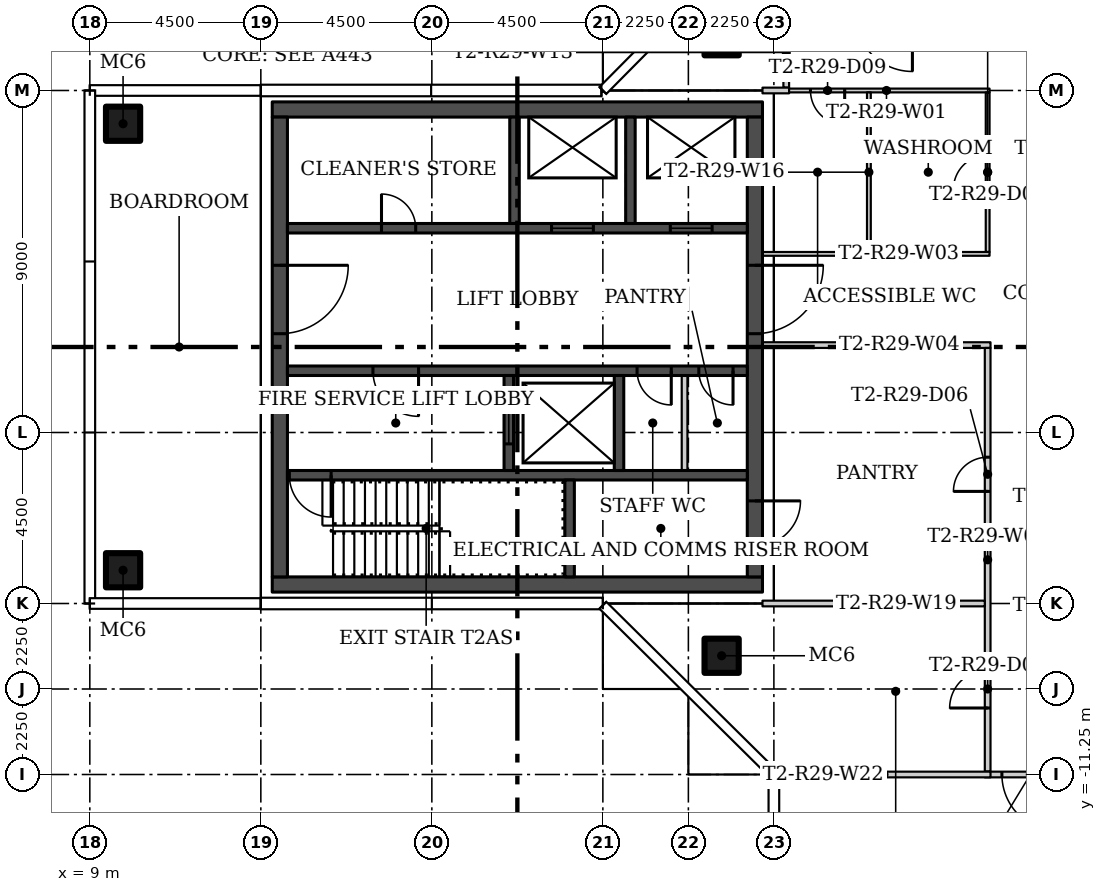
"""IFC4 building model, lengths in metres.
Left out: names, types, materials, properties, quantities, classifications, styles, units other than length and angle.
Written with IfcOpenShell. Run it as: python <this file> out.ifc"""

import sys

from ifc_helpers import new_model, si_unit, direction, frame, frame_2d, origin, origin_2d, place, context, subcontext, project, spatial, rectangle, hollow_rectangle, extrude, element, fill, save


model = new_model("IFC4")
c1 = context("Model", 3, precision=1e-05, world=origin(), true_north=direction((0.0, 1.0)))
c2 = subcontext(c1, "Body", "Model", "MODEL_VIEW")
j1 = project(units=[si_unit("LENGTHUNIT", "METRE"), si_unit("PLANEANGLEUNIT", "RADIAN")], contexts=[c1])
p1 = place(None, origin())
s1 = spatial("IfcSite", under=j1, at=p1, CompositionType="ELEMENT")
p2 = place(p1, origin())
s2 = spatial("IfcBuilding", under=s1, at=p2, CompositionType="ELEMENT")
p3 = place(p2, frame((0.0, 0.0, 261.6)))
s3 = spatial("IfcBuildingStorey", under=s2, at=p3, CompositionType="ELEMENT", Elevation=261.6)
for number, where in (
    (1, (25.625, 8.125, 0.0)),
    (2, (25.625, -8.125, 0.0)),
    (3, (9.875, -5.875, 0.0)),
    (4, (9.875, 5.875, 0.0)),
):
    element("IfcColumn", number, at=place(p3, frame(where)), inside=s3, PredefinedType="COLUMN", context=c2, shape_type="SweptSolid", body=[
        extrude(hollow_rectangle(XDim=0.9, YDim=0.9, WallThickness=0.036, at=origin_2d()), origin(), (0.0, 0.0, 1.0), 3.55),
    ])
p4 = place(p3, frame((32.675, 6.75, 0.0), z_axis=(0.0, 0.0, 1.0), x_axis=(-1.0, 0.0, 0.0)))
e5 = element("IfcWall", 5, at=p4, inside=s3, PredefinedType="PARTITIONING", context=c2, shape_type="SweptSolid", body=[
    extrude(rectangle(XDim=5.425, YDim=0.1, at=frame_2d((2.712, 0.0))), origin(), (0.0, 0.0, 1.0), 3.55),
])
p5 = place(p4, frame((3.812, 0.0, 0.0)))
e6 = element("IfcOpeningElement", 6, at=p5, cuts=e5, PredefinedType="OPENING", context=c2, shape_type="SweptSolid", body=[
    extrude(rectangle(XDim=0.9, YDim=2.1, at=frame_2d((0.45, 1.05))), frame((0.0, 0.06, 0.0), z_axis=(0.0, -1.0, 0.0), x_axis=(1.0, 0.0, 0.0)), (0.0, 0.0, 1.0), 0.12),
])
p6 = place(p3, frame((32.625, 2.5, 0.0), z_axis=(0.0, 0.0, 1.0), x_axis=(0.0, 1.0, 0.0)))
e7 = element("IfcWall", 7, at=p6, inside=s3, PredefinedType="PARTITIONING", context=c2, shape_type="SweptSolid", body=[
    extrude(rectangle(XDim=4.2, YDim=0.1, at=frame_2d((2.1, 0.0))), origin(), (0.0, 0.0, 1.0), 3.55),
])
p7 = place(p6, frame((1.65, 0.0, 0.0)))
e8 = element("IfcOpeningElement", 8, at=p7, cuts=e7, PredefinedType="OPENING", context=c2, shape_type="SweptSolid", body=[
    extrude(rectangle(XDim=0.9, YDim=2.1, at=frame_2d((0.45, 1.05))), frame((0.0, 0.06, 0.0), z_axis=(0.0, -1.0, 0.0), x_axis=(1.0, 0.0, 0.0)), (0.0, 0.0, 1.0), 0.12),
])
p8 = place(p3, frame((26.7, 2.45, 0.0)))
e9 = element("IfcWall", 9, at=p8, inside=s3, PredefinedType="PARTITIONING", context=c2, shape_type="SweptSolid", body=[
    extrude(rectangle(XDim=5.975, YDim=0.1, at=frame_2d((2.988, 0.0))), origin(), (0.0, 0.0, 1.0), 3.55),
])
p9 = place(p3, frame((32.7, 0.05, 0.0), z_axis=(0.0, 0.0, 1.0), x_axis=(-1.0, 0.0, 0.0)))
e10 = element("IfcWall", 10, at=p9, inside=s3, PredefinedType="PARTITIONING", context=c2, shape_type="SweptSolid", body=[
    extrude(rectangle(XDim=6.0, YDim=0.15, at=frame_2d((3.0, 0.0))), origin(), (0.0, 0.0, 1.0), 3.55),
])
p10 = place(p3, frame((32.625, -11.175, 0.0), z_axis=(0.0, 0.0, 1.0), x_axis=(0.0, 1.0, 0.0)))
e11 = element("IfcWall", 11, at=p10, inside=s3, PredefinedType="PARTITIONING", context=c2, shape_type="SweptSolid", body=[
    extrude(rectangle(XDim=11.15, YDim=0.15, at=frame_2d((5.575, 0.0))), origin(), (0.0, 0.0, 1.0), 3.55),
])
p11 = place(p10, frame((7.375, 0.0, 0.0)))
e12 = element("IfcOpeningElement", 12, at=p11, cuts=e11, PredefinedType="OPENING", context=c2, shape_type="SweptSolid", body=[
    extrude(rectangle(XDim=0.9, YDim=2.1, at=frame_2d((0.45, 1.05))), frame((0.0, 0.085, 0.0), z_axis=(0.0, -1.0, 0.0), x_axis=(1.0, 0.0, 0.0)), (0.0, 0.0, 1.0), 0.17),
])
p12 = place(p10, frame((1.675, 0.0, 0.0)))
e13 = element("IfcOpeningElement", 13, at=p12, cuts=e11, PredefinedType="OPENING", context=c2, shape_type="SweptSolid", body=[
    extrude(rectangle(XDim=1.0, YDim=2.4, at=frame_2d((0.5, 1.2))), frame((0.0, 0.085, 0.0), z_axis=(0.0, -1.0, 0.0), x_axis=(1.0, 0.0, 0.0)), (0.0, 0.0, 1.0), 0.17),
])
p13 = place(p3, frame((27.325, 8.675, 0.0), z_axis=(0.0, 0.0, 1.0), x_axis=(0.0, -1.0, 0.0)))
e14 = element("IfcWall", 14, at=p13, inside=s3, PredefinedType="PARTITIONING", context=c2, shape_type="SweptSolid", body=[
    extrude(rectangle(XDim=1.85, YDim=0.15, at=frame_2d((0.925, 0.0))), origin(), (0.0, 0.0, 1.0), 3.55),
])
p14 = place(p3, frame((34.95, -11.25, 0.0), z_axis=(0.0, 0.0, 1.0), x_axis=(-1.0, 0.0, 0.0)))
e15 = element("IfcWall", 15, at=p14, inside=s3, PredefinedType="PARTITIONING", context=c2, shape_type="SweptSolid", body=[
    extrude(rectangle(XDim=2.4, YDim=0.15, at=frame_2d((1.2, 0.0))), origin(), (0.0, 0.0, 1.0), 3.55),
])
p15 = place(p14, frame((0.45, 0.0, 0.0)))
e16 = element("IfcOpeningElement", 16, at=p15, cuts=e15, PredefinedType="OPENING", context=c2, shape_type="SweptSolid", body=[
    extrude(rectangle(XDim=1.5, YDim=2.1, at=frame_2d((0.75, 1.05))), frame((0.0, 0.085, 0.0), z_axis=(0.0, -1.0, 0.0), x_axis=(1.0, 0.0, 0.0)), (0.0, 0.0, 1.0), 0.17),
])
p16 = place(p3, frame((29.5, 6.7, 0.0), z_axis=(0.0, 0.0, 1.0), x_axis=(0.0, -1.0, 0.0)))
e17 = element("IfcWall", 17, at=p16, inside=s3, PredefinedType="PARTITIONING", context=c2, shape_type="SweptSolid", body=[
    extrude(rectangle(XDim=4.2, YDim=0.1, at=frame_2d((2.1, 0.0))), origin(), (0.0, 0.0, 1.0), 3.55),
])
p17 = place(p3, frame((27.4, 6.75, 0.0), z_axis=(0.0, 0.0, 1.0), x_axis=(-1.0, 0.0, 0.0)))
e18 = element("IfcWall", 18, at=p17, inside=s3, PredefinedType="PARTITIONING", context=c2, shape_type="SweptSolid", body=[
    extrude(rectangle(XDim=0.7, YDim=0.15, at=frame_2d((0.35, 0.0))), origin(), (0.0, 0.0, 1.0), 3.55),
])
p18 = place(p3, frame((26.7, -6.75, 0.0)))
e19 = element("IfcWall", 19, at=p18, inside=s3, PredefinedType="PARTITIONING", context=c2, shape_type="SweptSolid", body=[
    extrude(rectangle(XDim=5.85, YDim=0.15, at=frame_2d((2.925, 0.0))), origin(), (0.0, 0.0, 1.0), 3.55),
])
p19 = place(p3, frame((27.095, -11.25, 0.0)))
e20 = element("IfcWall", 20, at=p19, inside=s3, PredefinedType="PARTITIONING", context=c2, shape_type="SweptSolid", body=[
    extrude(rectangle(XDim=5.605, YDim=0.15, at=frame_2d((2.802, 0.0))), origin(), (0.0, 0.0, 1.0), 3.55),
])
for number, where in (
    (21, (13.8, -6.25, 0.0)),
    (22, (13.8, 6.25, 0.0)),
):
    element("IfcWall", number, at=place(p3, frame(where)), inside=s3, PredefinedType="SHEAR", context=c2, shape_type="SweptSolid", body=[
        extrude(rectangle(XDim=12.9, YDim=0.4, at=frame_2d((6.45, 0.0))), origin(), (0.0, 0.0, 1.0), 3.55),
    ])
p20 = place(p3, frame((14.0, 6.05, 0.0), z_axis=(0.0, 0.0, 1.0), x_axis=(0.0, -1.0, 0.0)))
e23 = element("IfcWall", 23, at=p20, inside=s3, PredefinedType="SHEAR", context=c2, shape_type="SweptSolid", body=[
    extrude(rectangle(XDim=12.1, YDim=0.4, at=frame_2d((6.05, 0.0))), origin(), (0.0, 0.0, 1.0), 3.55),
])
p21 = place(p20, frame((3.9, 0.0, 0.0)))
e24 = element("IfcOpeningElement", 24, at=p21, cuts=e23, PredefinedType="OPENING", context=c2, shape_type="SweptSolid", body=[
    extrude(rectangle(XDim=1.8, YDim=2.4, at=frame_2d((0.9, 1.2))), frame((0.0, 0.21, 0.0), z_axis=(0.0, -1.0, 0.0), x_axis=(1.0, 0.0, 0.0)), (0.0, 0.0, 1.0), 0.42),
])
p22 = place(p3, frame((26.5, 6.05, 0.0), z_axis=(0.0, 0.0, 1.0), x_axis=(0.0, -1.0, 0.0)))
e25 = element("IfcWall", 25, at=p22, inside=s3, PredefinedType="SHEAR", context=c2, shape_type="SweptSolid", body=[
    extrude(rectangle(XDim=12.1, YDim=0.4, at=frame_2d((6.05, 0.0))), origin(), (0.0, 0.0, 1.0), 3.55),
])
p23 = place(p22, frame((10.1, 0.0, 0.0)))
e26 = element("IfcOpeningElement", 26, at=p23, cuts=e25, PredefinedType="OPENING", context=c2, shape_type="SweptSolid", body=[
    extrude(rectangle(XDim=1.2, YDim=2.1, at=frame_2d((0.6, 1.05))), frame((0.0, 0.21, 0.0), z_axis=(0.0, -1.0, 0.0), x_axis=(1.0, 0.0, 0.0)), (0.0, 0.0, 1.0), 0.42),
])
p24 = place(p22, frame((3.9, 0.0, 0.0)))
e27 = element("IfcOpeningElement", 27, at=p24, cuts=e25, PredefinedType="OPENING", context=c2, shape_type="SweptSolid", body=[
    extrude(rectangle(XDim=1.8, YDim=2.4, at=frame_2d((0.9, 1.2))), frame((0.0, 0.21, 0.0), z_axis=(0.0, -1.0, 0.0), x_axis=(1.0, 0.0, 0.0)), (0.0, 0.0, 1.0), 0.42),
])
p25 = place(p3, frame((26.3, -3.375, 0.0), z_axis=(0.0, 0.0, 1.0), x_axis=(-1.0, 0.0, 0.0)))
e28 = element("IfcWall", 28, at=p25, inside=s3, PredefinedType="SHEAR", context=c2, shape_type="SweptSolid", body=[
    extrude(rectangle(XDim=12.1, YDim=0.25, at=frame_2d((6.05, 0.0))), origin(), (0.0, 0.0, 1.0), 3.55),
])
p26 = place(p25, frame((10.95, 0.0, 0.0)))
e29 = element("IfcOpeningElement", 29, at=p26, cuts=e28, PredefinedType="OPENING", context=c2, shape_type="SweptSolid", body=[
    extrude(rectangle(XDim=1.1, YDim=2.1, at=frame_2d((0.55, 1.05))), frame((0.0, 0.135, 0.0), z_axis=(0.0, -1.0, 0.0), x_axis=(1.0, 0.0, 0.0)), (0.0, 0.0, 1.0), 0.27),
])
p27 = place(p3, frame((21.625, -6.05, 0.0), z_axis=(0.0, 0.0, 1.0), x_axis=(0.0, 1.0, 0.0)))
e30 = element("IfcWall", 30, at=p27, inside=s3, PredefinedType="SHEAR", context=c2, shape_type="SweptSolid", body=[
    extrude(rectangle(XDim=2.55, YDim=0.25, at=frame_2d((1.275, 0.0))), origin(), (0.0, 0.0, 1.0), 3.55),
])
p28 = place(p3, frame((26.3, -0.625, 0.0), z_axis=(0.0, 0.0, 1.0), x_axis=(-1.0, 0.0, 0.0)))
e31 = element("IfcWall", 31, at=p28, inside=s3, PredefinedType="SHEAR", context=c2, shape_type="SweptSolid", body=[
    extrude(rectangle(XDim=12.1, YDim=0.25, at=frame_2d((6.05, 0.0))), origin(), (0.0, 0.0, 1.0), 3.55),
])
p29 = place(p28, frame((8.65, 0.0, 0.0)))
e32 = element("IfcOpeningElement", 32, at=p29, cuts=e31, PredefinedType="OPENING", context=c2, shape_type="SweptSolid", body=[
    extrude(rectangle(XDim=1.2, YDim=2.1, at=frame_2d((0.6, 1.05))), frame((0.0, 0.135, 0.0), z_axis=(0.0, -1.0, 0.0), x_axis=(1.0, 0.0, 0.0)), (0.0, 0.0, 1.0), 0.27),
])
p30 = place(p28, frame((2.0, 0.0, 0.0)))
e33 = element("IfcOpeningElement", 33, at=p30, cuts=e31, PredefinedType="OPENING", context=c2, shape_type="SweptSolid", body=[
    extrude(rectangle(XDim=0.9, YDim=2.1, at=frame_2d((0.45, 1.05))), frame((0.0, 0.135, 0.0), z_axis=(0.0, -1.0, 0.0), x_axis=(1.0, 0.0, 0.0)), (0.0, 0.0, 1.0), 0.27),
])
p31 = place(p28, frame((0.375, 0.0, 0.0)))
e34 = element("IfcOpeningElement", 34, at=p31, cuts=e31, PredefinedType="OPENING", context=c2, shape_type="SweptSolid", body=[
    extrude(rectangle(XDim=0.9, YDim=2.1, at=frame_2d((0.45, 1.05))), frame((0.0, 0.135, 0.0), z_axis=(0.0, -1.0, 0.0), x_axis=(1.0, 0.0, 0.0)), (0.0, 0.0, 1.0), 0.27),
])
p32 = place(p3, frame((20.025, -3.25, 0.0), z_axis=(0.0, 0.0, 1.0), x_axis=(0.0, 1.0, 0.0)))
e35 = element("IfcWall", 35, at=p32, inside=s3, PredefinedType="SHEAR", context=c2, shape_type="SweptSolid", body=[
    extrude(rectangle(XDim=2.5, YDim=0.25, at=frame_2d((1.25, 0.0))), origin(), (0.0, 0.0, 1.0), 3.55),
])
p33 = place(p32, frame((0.7, 0.0, 0.0)))
e36 = element("IfcOpeningElement", 36, at=p33, cuts=e35, PredefinedType="OPENING", context=c2, shape_type="SweptSolid", body=[
    extrude(rectangle(XDim=1.1, YDim=2.1, at=frame_2d((0.55, 1.05))), frame((0.0, 0.135, 0.0), z_axis=(0.0, -1.0, 0.0), x_axis=(1.0, 0.0, 0.0)), (0.0, 0.0, 1.0), 0.27),
])
p34 = place(p3, frame((22.925, -3.25, 0.0), z_axis=(0.0, 0.0, 1.0), x_axis=(0.0, 1.0, 0.0)))
e37 = element("IfcWall", 37, at=p34, inside=s3, PredefinedType="SHEAR", context=c2, shape_type="SweptSolid", body=[
    extrude(rectangle(XDim=2.5, YDim=0.25, at=frame_2d((1.25, 0.0))), origin(), (0.0, 0.0, 1.0), 3.55),
])
p35 = place(p3, frame((24.65, -3.25, 0.0), z_axis=(0.0, 0.0, 1.0), x_axis=(0.0, 1.0, 0.0)))
e38 = element("IfcWall", 38, at=p35, inside=s3, PredefinedType="PARTITIONING", context=c2, shape_type="SweptSolid", body=[
    extrude(rectangle(XDim=2.5, YDim=0.15, at=frame_2d((1.25, 0.0))), origin(), (0.0, 0.0, 1.0), 3.55),
])
p36 = place(p3, frame((14.2, 3.125, 0.0)))
e39 = element("IfcWall", 39, at=p36, inside=s3, PredefinedType="SHEAR", context=c2, shape_type="SweptSolid", body=[
    extrude(rectangle(XDim=12.1, YDim=0.25, at=frame_2d((6.05, 0.0))), origin(), (0.0, 0.0, 1.0), 3.55),
])
p37 = place(p36, frame((6.95, 0.0, 0.0)))
e40 = element("IfcOpeningElement", 40, at=p37, cuts=e39, PredefinedType="OPENING", context=c2, shape_type="SweptSolid", body=[
    extrude(rectangle(XDim=1.1, YDim=2.1, at=frame_2d((0.55, 1.05))), frame((0.0, 0.135, 0.0), z_axis=(0.0, -1.0, 0.0), x_axis=(1.0, 0.0, 0.0)), (0.0, 0.0, 1.0), 0.27),
])
p38 = place(p36, frame((10.075, 0.0, 0.0)))
e41 = element("IfcOpeningElement", 41, at=p38, cuts=e39, PredefinedType="OPENING", context=c2, shape_type="SweptSolid", body=[
    extrude(rectangle(XDim=1.1, YDim=2.1, at=frame_2d((0.55, 1.05))), frame((0.0, 0.135, 0.0), z_axis=(0.0, -1.0, 0.0), x_axis=(1.0, 0.0, 0.0)), (0.0, 0.0, 1.0), 0.27),
])
p39 = place(p36, frame((2.475, 0.0, 0.0)))
e42 = element("IfcOpeningElement", 42, at=p39, cuts=e39, PredefinedType="OPENING", context=c2, shape_type="SweptSolid", body=[
    extrude(rectangle(XDim=0.9, YDim=2.1, at=frame_2d((0.45, 1.05))), frame((0.0, 0.135, 0.0), z_axis=(0.0, -1.0, 0.0), x_axis=(1.0, 0.0, 0.0)), (0.0, 0.0, 1.0), 0.27),
])
for number, where, z_axis, x_axis in (
    (43, (20.175, 3.25, 0.0), (0.0, 0.0, 1.0), (0.0, 1.0, 0.0)),
    (44, (23.225, 3.25, 0.0), (0.0, 0.0, 1.0), (0.0, 1.0, 0.0)),
):
    element("IfcWall", number, at=place(p3, frame(where, z_axis=z_axis, x_axis=x_axis)), inside=s3, PredefinedType="SHEAR", context=c2, shape_type="SweptSolid", body=[
        extrude(rectangle(XDim=2.8, YDim=0.25, at=frame_2d((1.4, 0.0))), origin(), (0.0, 0.0, 1.0), 3.55),
    ])
p40 = place(p15, origin())
e45 = element("IfcDoor", 45, at=p40, inside=s3, OperationType="DOUBLE_DOOR_SINGLE_SWING", PredefinedType="DOOR", context=c2, shape_type="SweptSolid", body=[
    extrude(rectangle(XDim=1.5, YDim=2.1, at=frame_2d((0.75, 1.05))), frame((0.0, 0.025, 0.0), z_axis=(0.0, -1.0, 0.0), x_axis=(1.0, 0.0, 0.0)), (0.0, 0.0, 1.0), 0.05),
])
fill(e16, e45)
p41 = place(p11, origin())
e46 = element("IfcDoor", 46, at=p41, inside=s3, OperationType="SINGLE_SWING_RIGHT", PredefinedType="DOOR", context=c2, shape_type="SweptSolid", body=[
    extrude(rectangle(XDim=0.9, YDim=2.1, at=frame_2d((0.45, 1.05))), frame((0.0, 0.025, 0.0), z_axis=(0.0, -1.0, 0.0), x_axis=(1.0, 0.0, 0.0)), (0.0, 0.0, 1.0), 0.05),
])
fill(e12, e46)
p42 = place(p12, origin())
e47 = element("IfcDoor", 47, at=p42, inside=s3, OperationType="SINGLE_SWING_RIGHT", PredefinedType="DOOR", context=c2, shape_type="SweptSolid", body=[
    extrude(rectangle(XDim=1.0, YDim=2.4, at=frame_2d((0.5, 1.2))), frame((0.0, 0.025, 0.0), z_axis=(0.0, -1.0, 0.0), x_axis=(1.0, 0.0, 0.0)), (0.0, 0.0, 1.0), 0.05),
])
fill(e13, e47)
p43 = place(p7, origin())
e48 = element("IfcDoor", 48, at=p43, inside=s3, OperationType="SINGLE_SWING_LEFT", PredefinedType="DOOR", context=c2, shape_type="SweptSolid", body=[
    extrude(rectangle(XDim=0.9, YDim=2.1, at=frame_2d((0.45, 1.05))), frame((0.0, 0.025, 0.0), z_axis=(0.0, -1.0, 0.0), x_axis=(1.0, 0.0, 0.0)), (0.0, 0.0, 1.0), 0.05),
])
fill(e8, e48)
p44 = place(p5, origin())
e49 = element("IfcDoor", 49, at=p44, inside=s3, OperationType="SINGLE_SWING_LEFT", PredefinedType="DOOR", context=c2, shape_type="SweptSolid", body=[
    extrude(rectangle(XDim=0.9, YDim=2.1, at=frame_2d((0.45, 1.05))), frame((0.0, 0.025, 0.0), z_axis=(0.0, -1.0, 0.0), x_axis=(1.0, 0.0, 0.0)), (0.0, 0.0, 1.0), 0.05),
])
fill(e6, e49)
p45 = place(p21, origin())
e50 = element("IfcDoor", 50, at=p45, inside=s3, OperationType="DOUBLE_DOOR_SINGLE_SWING", PredefinedType="DOOR", context=c2, shape_type="SweptSolid", body=[
    extrude(rectangle(XDim=1.8, YDim=2.4, at=frame_2d((0.9, 1.2))), frame((0.0, 0.025, 0.0), z_axis=(0.0, -1.0, 0.0), x_axis=(1.0, 0.0, 0.0)), (0.0, 0.0, 1.0), 0.05),
])
fill(e24, e50)
p46 = place(p23, origin())
e51 = element("IfcDoor", 51, at=p46, inside=s3, OperationType="SINGLE_SWING_RIGHT", PredefinedType="DOOR", context=c2, shape_type="SweptSolid", body=[
    extrude(rectangle(XDim=1.2, YDim=2.1, at=frame_2d((0.6, 1.05))), frame((0.0, 0.025, 0.0), z_axis=(0.0, -1.0, 0.0), x_axis=(1.0, 0.0, 0.0)), (0.0, 0.0, 1.0), 0.05),
])
fill(e26, e51)
p47 = place(p24, origin())
e52 = element("IfcDoor", 52, at=p47, inside=s3, OperationType="DOUBLE_DOOR_SINGLE_SWING", PredefinedType="DOOR", context=c2, shape_type="SweptSolid", body=[
    extrude(rectangle(XDim=1.8, YDim=2.4, at=frame_2d((0.9, 1.2))), frame((0.0, 0.025, 0.0), z_axis=(0.0, -1.0, 0.0), x_axis=(1.0, 0.0, 0.0)), (0.0, 0.0, 1.0), 0.05),
])
fill(e27, e52)
p48 = place(p26, origin())
e53 = element("IfcDoor", 53, at=p48, inside=s3, OperationType="SINGLE_SWING_RIGHT", PredefinedType="DOOR", context=c2, shape_type="SweptSolid", body=[
    extrude(rectangle(XDim=1.1, YDim=2.1, at=frame_2d((0.55, 1.05))), frame((0.0, 0.025, 0.0), z_axis=(0.0, -1.0, 0.0), x_axis=(1.0, 0.0, 0.0)), (0.0, 0.0, 1.0), 0.05),
])
fill(e29, e53)
p49 = place(p29, origin())
e54 = element("IfcDoor", 54, at=p49, inside=s3, OperationType="SINGLE_SWING_RIGHT", PredefinedType="DOOR", context=c2, shape_type="SweptSolid", body=[
    extrude(rectangle(XDim=1.2, YDim=2.1, at=frame_2d((0.6, 1.05))), frame((0.0, 0.025, 0.0), z_axis=(0.0, -1.0, 0.0), x_axis=(1.0, 0.0, 0.0)), (0.0, 0.0, 1.0), 0.05),
])
fill(e32, e54)
p50 = place(p30, origin())
e55 = element("IfcDoor", 55, at=p50, inside=s3, OperationType="SINGLE_SWING_LEFT", PredefinedType="DOOR", context=c2, shape_type="SweptSolid", body=[
    extrude(rectangle(XDim=0.9, YDim=2.1, at=frame_2d((0.45, 1.05))), frame((0.0, 0.025, 0.0), z_axis=(0.0, -1.0, 0.0), x_axis=(1.0, 0.0, 0.0)), (0.0, 0.0, 1.0), 0.05),
])
fill(e33, e55)
p51 = place(p31, origin())
e56 = element("IfcDoor", 56, at=p51, inside=s3, OperationType="SINGLE_SWING_LEFT", PredefinedType="DOOR", context=c2, shape_type="SweptSolid", body=[
    extrude(rectangle(XDim=0.9, YDim=2.1, at=frame_2d((0.45, 1.05))), frame((0.0, 0.025, 0.0), z_axis=(0.0, -1.0, 0.0), x_axis=(1.0, 0.0, 0.0)), (0.0, 0.0, 1.0), 0.05),
])
fill(e34, e56)
p52 = place(p33, origin())
e57 = element("IfcDoor", 57, at=p52, inside=s3, OperationType="SLIDING_TO_LEFT", PredefinedType="DOOR", context=c2, shape_type="SweptSolid", body=[
    extrude(rectangle(XDim=1.1, YDim=2.1, at=frame_2d((0.55, 1.05))), frame((0.0, 0.025, 0.0), z_axis=(0.0, -1.0, 0.0), x_axis=(1.0, 0.0, 0.0)), (0.0, 0.0, 1.0), 0.05),
])
fill(e36, e57)
p53 = place(p37, origin())
e58 = element("IfcDoor", 58, at=p53, inside=s3, OperationType="SLIDING_TO_LEFT", PredefinedType="DOOR", context=c2, shape_type="SweptSolid", body=[
    extrude(rectangle(XDim=1.1, YDim=2.1, at=frame_2d((0.55, 1.05))), frame((0.0, 0.025, 0.0), z_axis=(0.0, -1.0, 0.0), x_axis=(1.0, 0.0, 0.0)), (0.0, 0.0, 1.0), 0.05),
])
fill(e40, e58)
p54 = place(p38, origin())
e59 = element("IfcDoor", 59, at=p54, inside=s3, OperationType="SLIDING_TO_LEFT", PredefinedType="DOOR", context=c2, shape_type="SweptSolid", body=[
    extrude(rectangle(XDim=1.1, YDim=2.1, at=frame_2d((0.55, 1.05))), frame((0.0, 0.025, 0.0), z_axis=(0.0, -1.0, 0.0), x_axis=(1.0, 0.0, 0.0)), (0.0, 0.0, 1.0), 0.05),
])
fill(e41, e59)
p55 = place(p39, origin())
e60 = element("IfcDoor", 60, at=p55, inside=s3, OperationType="SINGLE_SWING_LEFT", PredefinedType="DOOR", context=c2, shape_type="SweptSolid", body=[
    extrude(rectangle(XDim=0.9, YDim=2.1, at=frame_2d((0.45, 1.05))), frame((0.0, 0.025, 0.0), z_axis=(0.0, -1.0, 0.0), x_axis=(1.0, 0.0, 0.0)), (0.0, 0.0, 1.0), 0.05),
])
fill(e42, e60)
save(model, sys.argv[1])
